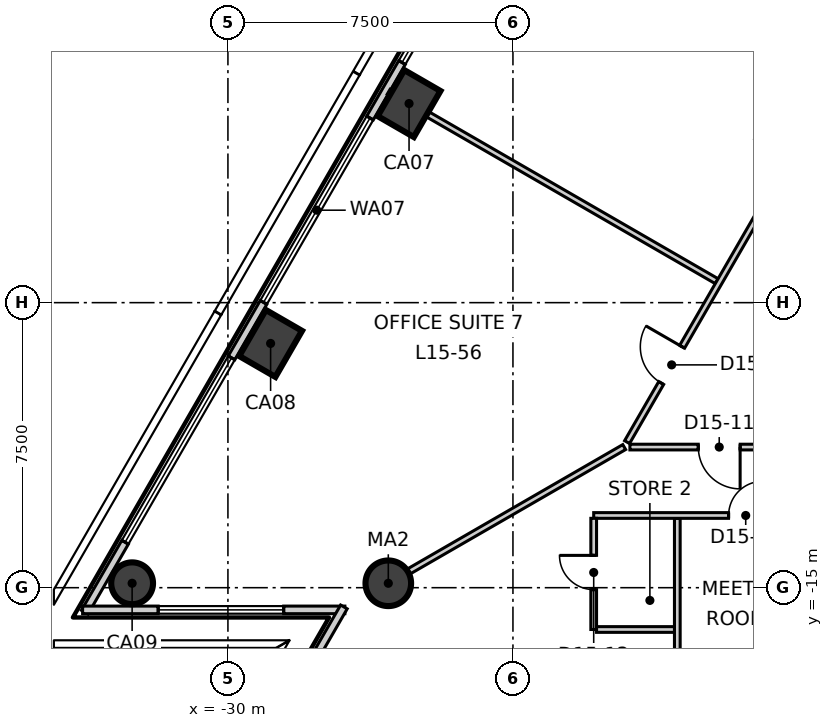
"""IFC4 building model, lengths in metres.
Left out: names, types, materials, properties, quantities, classifications, styles, units other than length and angle.
Written with IfcOpenShell. Run it as: python <this file> out.ifc"""

import sys

from ifc_helpers import new_model, si_unit, direction, frame, frame_2d, origin, origin_2d, place, context, subcontext, project, spatial, rectangle, circle, extrude, element, fill, save


model = new_model("IFC4")
c1 = context("Model", 3, precision=1e-05, world=origin(), true_north=direction((0.0, 1.0)))
c2 = subcontext(c1, "Body", "Model", "MODEL_VIEW")
j1 = project(units=[si_unit("LENGTHUNIT", "METRE"), si_unit("PLANEANGLEUNIT", "RADIAN")], contexts=[c1])
p1 = place(None, origin())
s1 = spatial("IfcSite", under=j1, at=p1, CompositionType="ELEMENT")
p2 = place(p1, origin())
s2 = spatial("IfcBuilding", under=s1, at=p2, CompositionType="ELEMENT")
p3 = place(p2, frame((0.0, 0.0, 71.3)))
s3 = spatial("IfcBuildingStorey", under=s2, at=p3, CompositionType="ELEMENT", Elevation=71.3)
for number, where, z_axis, x_axis in (
    (1, (-25.234, -2.261, -0.3), (0.0, 0.0, 1.0), (0.5, 0.866, 0.0)),
    (2, (-28.877, -8.573, -0.3), (0.0, 0.0, 1.0), (0.5, 0.866, 0.0)),
):
    element("IfcColumn", number, at=place(p3, frame(where, z_axis=z_axis, x_axis=x_axis)), inside=s3, PredefinedType="COLUMN", context=c2, shape_type="SweptSolid", body=[
        extrude(rectangle(XDim=1.4, YDim=1.1, at=origin_2d()), origin(), (0.0, 0.0, 1.0), 4.0),
    ])
p4 = place(p3, frame((-32.521, -14.884, -0.3), z_axis=(0.0, 0.0, 1.0), x_axis=(0.5, 0.866025403784, 0.0)))
e3 = element("IfcColumn", 3, at=p4, inside=s3, PredefinedType="COLUMN", context=c2, shape_type="SweptSolid", body=[
    extrude(circle(Radius=0.55, at=origin_2d()), origin(), (0.0, 0.0, 1.0), 4.0),
])
p5 = place(p3, frame((-25.78, -14.884, -0.3), z_axis=(0.0, 0.0, 1.0), x_axis=(1.0, 0.0, 0.0)))
e4 = element("IfcColumn", 4, at=p5, inside=s3, PredefinedType="COLUMN", context=c2, shape_type="SweptSolid", body=[
    extrude(circle(Radius=0.6, at=origin_2d()), origin(), (0.0, 0.0, 1.0), 4.0),
])
p6 = place(p3, frame((-3.326, 37.084, 0.0), z_axis=(0.0, 0.0, 1.0), x_axis=(-0.500000131003, -0.86602532815, 0.0)))
e5 = element("IfcWall", 5, at=p6, inside=s3, PredefinedType="ELEMENTEDWALL", context=c2, shape_type="SweptSolid", body=[
    extrude(rectangle(XDim=60.886, YDim=0.2, at=frame_2d((30.443, 0.0))), origin(), (0.0, 0.0, 1.0), 3.7),
])
p7 = place(p6, frame((2.146, 0.0, 0.9)))
e6 = element("IfcOpeningElement", 6, at=p7, cuts=e5, PredefinedType="OPENING", context=c2, shape_type="SweptSolid", body=[
    extrude(rectangle(XDim=5.6, YDim=2.5, at=frame_2d((2.8, 1.25))), frame((0.0, 0.11, 0.0), z_axis=(0.0, -1.0, 0.0), x_axis=(1.0, 0.0, 0.0)), (0.0, 0.0, 1.0), 0.22),
])
p8 = place(p6, frame((9.434, 0.0, 0.9)))
e7 = element("IfcOpeningElement", 7, at=p8, cuts=e5, PredefinedType="OPENING", context=c2, shape_type="SweptSolid", body=[
    extrude(rectangle(XDim=5.6, YDim=2.5, at=frame_2d((2.8, 1.25))), frame((0.0, 0.11, 0.0), z_axis=(0.0, -1.0, 0.0), x_axis=(1.0, 0.0, 0.0)), (0.0, 0.0, 1.0), 0.22),
])
p9 = place(p6, frame((16.721, 0.0, 0.9)))
e8 = element("IfcOpeningElement", 8, at=p9, cuts=e5, PredefinedType="OPENING", context=c2, shape_type="SweptSolid", body=[
    extrude(rectangle(XDim=5.6, YDim=2.5, at=frame_2d((2.8, 1.25))), frame((0.0, 0.11, 0.0), z_axis=(0.0, -1.0, 0.0), x_axis=(1.0, 0.0, 0.0)), (0.0, 0.0, 1.0), 0.22),
])
p10 = place(p6, frame((24.009, 0.0, 0.9)))
e9 = element("IfcOpeningElement", 9, at=p10, cuts=e5, PredefinedType="OPENING", context=c2, shape_type="SweptSolid", body=[
    extrude(rectangle(XDim=5.6, YDim=2.5, at=frame_2d((2.8, 1.25))), frame((0.0, 0.11, 0.0), z_axis=(0.0, -1.0, 0.0), x_axis=(1.0, 0.0, 0.0)), (0.0, 0.0, 1.0), 0.22),
])
p11 = place(p6, frame((31.297, 0.0, 0.9)))
e10 = element("IfcOpeningElement", 10, at=p11, cuts=e5, PredefinedType="OPENING", context=c2, shape_type="SweptSolid", body=[
    extrude(rectangle(XDim=5.6, YDim=2.5, at=frame_2d((2.8, 1.25))), frame((0.0, 0.11, 0.0), z_axis=(0.0, -1.0, 0.0), x_axis=(1.0, 0.0, 0.0)), (0.0, 0.0, 1.0), 0.22),
])
p12 = place(p6, frame((38.584, 0.0, 0.9)))
e11 = element("IfcOpeningElement", 11, at=p12, cuts=e5, PredefinedType="OPENING", context=c2, shape_type="SweptSolid", body=[
    extrude(rectangle(XDim=5.6, YDim=2.5, at=frame_2d((2.8, 1.25))), frame((0.0, 0.11, 0.0), z_axis=(0.0, -1.0, 0.0), x_axis=(1.0, 0.0, 0.0)), (0.0, 0.0, 1.0), 0.22),
])
p13 = place(p6, frame((45.872, 0.0, 0.9)))
e12 = element("IfcOpeningElement", 12, at=p13, cuts=e5, PredefinedType="OPENING", context=c2, shape_type="SweptSolid", body=[
    extrude(rectangle(XDim=5.6, YDim=2.5, at=frame_2d((2.8, 1.25))), frame((0.0, 0.11, 0.0), z_axis=(0.0, -1.0, 0.0), x_axis=(1.0, 0.0, 0.0)), (0.0, 0.0, 1.0), 0.22),
])
p14 = place(p6, frame((53.159, 0.0, 0.9)))
e13 = element("IfcOpeningElement", 13, at=p14, cuts=e5, PredefinedType="OPENING", context=c2, shape_type="SweptSolid", body=[
    extrude(rectangle(XDim=5.6, YDim=2.5, at=frame_2d((2.8, 1.25))), frame((0.0, 0.11, 0.0), z_axis=(0.0, -1.0, 0.0), x_axis=(1.0, 0.0, 0.0)), (0.0, 0.0, 1.0), 0.22),
])
p15 = place(p3, frame((-33.824, -15.584, 0.0), z_axis=(0.0, 0.0, 1.0), x_axis=(1.0, 0.0, 0.0)))
e14 = element("IfcWall", 14, at=p15, inside=s3, PredefinedType="ELEMENTEDWALL", context=c2, shape_type="SweptSolid", body=[
    extrude(rectangle(XDim=6.901, YDim=0.2, at=frame_2d((3.45, 0.0))), origin(), (0.0, 0.0, 1.0), 3.7),
])
p16 = place(p15, frame((1.99, 0.0, 0.9)))
e15 = element("IfcOpeningElement", 15, at=p16, cuts=e14, PredefinedType="OPENING", context=c2, shape_type="SweptSolid", body=[
    extrude(rectangle(XDim=3.3, YDim=2.5, at=frame_2d((1.65, 1.25))), frame((0.0, 0.11, 0.0), z_axis=(0.0, -1.0, 0.0), x_axis=(1.0, 0.0, 0.0)), (0.0, 0.0, 1.0), 0.22),
])
p17 = place(p3, frame((-26.948, -15.506, 0.0), z_axis=(0.0, 0.0, 1.0), x_axis=(-0.499917428568, -0.866073071175, 0.0)))
e16 = element("IfcWall", 16, at=p17, inside=s3, PredefinedType="ELEMENTEDWALL", context=c2, shape_type="SweptSolid", body=[
    extrude(rectangle(XDim=6.901, YDim=0.2, at=frame_2d((3.451, 0.0))), origin(), (0.0, 0.0, 1.0), 3.7),
])
p18 = place(p17, frame((1.39, 0.0, 0.9)))
e17 = element("IfcOpeningElement", 17, at=p18, cuts=e16, PredefinedType="OPENING", context=c2, shape_type="SweptSolid", body=[
    extrude(rectangle(XDim=3.3, YDim=2.5, at=frame_2d((1.65, 1.25))), frame((0.0, 0.11, 0.0), z_axis=(0.0, -1.0, 0.0), x_axis=(1.0, 0.0, 0.0)), (0.0, 0.0, 1.0), 0.22),
])
p19 = place(p3, frame((-26.317, -15.194, 0.0), z_axis=(0.0, 0.0, 1.0), x_axis=(0.866031591824, 0.499989281847, 0.0)))
e18 = element("IfcWall", 18, at=p19, inside=s3, PredefinedType="PARTITIONING", context=c2, shape_type="SweptSolid", body=[
    extrude(rectangle(XDim=7.788, YDim=0.15, at=frame_2d((3.894, 0.0))), origin(), (0.0, 0.0, 1.0), 3.1),
])
p20 = place(p3, frame((-25.771, -1.951, 0.0), z_axis=(0.0, 0.0, 1.0), x_axis=(0.866008152443, -0.500029879009, 0.0)))
e19 = element("IfcWall", 19, at=p20, inside=s3, PredefinedType="PARTITIONING", context=c2, shape_type="SweptSolid", body=[
    extrude(rectangle(XDim=9.968, YDim=0.15, at=frame_2d((4.984, 0.0))), origin(), (0.0, 0.0, 1.0), 3.7),
])
p21 = place(p3, frame((-19.497, -11.17, 0.0), z_axis=(0.0, 0.0, 1.0), x_axis=(0.499998854553, 0.866026065108, 0.0)))
e20 = element("IfcWall", 20, at=p21, inside=s3, PredefinedType="PARTITIONING", context=c2, shape_type="SweptSolid", body=[
    extrude(rectangle(XDim=38.994, YDim=0.15, at=frame_2d((19.497, 0.0))), origin(), (0.0, 0.0, 1.0), 3.7),
])
p22 = place(p21, frame((35.944, 0.0, 0.0)))
e21 = element("IfcOpeningElement", 21, at=p22, cuts=e20, PredefinedType="OPENING", context=c2, shape_type="SweptSolid", body=[
    extrude(rectangle(XDim=1.1, YDim=2.1, at=frame_2d((0.55, 1.05))), frame((0.0, 0.085, 0.0), z_axis=(0.0, -1.0, 0.0), x_axis=(1.0, 0.0, 0.0)), (0.0, 0.0, 1.0), 0.17),
])
p23 = place(p21, frame((26.148, 0.0, 0.0)))
e22 = element("IfcOpeningElement", 22, at=p23, cuts=e20, PredefinedType="OPENING", context=c2, shape_type="SweptSolid", body=[
    extrude(rectangle(XDim=1.1, YDim=2.1, at=frame_2d((0.55, 1.05))), frame((0.0, 0.085, 0.0), z_axis=(0.0, -1.0, 0.0), x_axis=(1.0, 0.0, 0.0)), (0.0, 0.0, 1.0), 0.17),
])
p24 = place(p21, frame((8.572, 0.0, 0.0)))
e23 = element("IfcOpeningElement", 23, at=p24, cuts=e20, PredefinedType="OPENING", context=c2, shape_type="SweptSolid", body=[
    extrude(rectangle(XDim=1.1, YDim=2.1, at=frame_2d((0.55, 1.05))), frame((0.0, 0.085, 0.0), z_axis=(0.0, -1.0, 0.0), x_axis=(1.0, 0.0, 0.0)), (0.0, 0.0, 1.0), 0.17),
])
p25 = place(p21, frame((17.172, 0.0, 0.0)))
e24 = element("IfcOpeningElement", 24, at=p25, cuts=e20, PredefinedType="OPENING", context=c2, shape_type="SweptSolid", body=[
    extrude(rectangle(XDim=0.9, YDim=2.1, at=frame_2d((0.45, 1.05))), frame((0.0, 0.085, 0.0), z_axis=(0.0, -1.0, 0.0), x_axis=(1.0, 0.0, 0.0)), (0.0, 0.0, 1.0), 0.17),
])
p26 = place(p21, frame((14.172, 0.0, 0.0)))
e25 = element("IfcOpeningElement", 25, at=p26, cuts=e20, PredefinedType="OPENING", context=c2, shape_type="SweptSolid", body=[
    extrude(rectangle(XDim=0.9, YDim=2.1, at=frame_2d((0.45, 1.05))), frame((0.0, 0.085, 0.0), z_axis=(0.0, -1.0, 0.0), x_axis=(1.0, 0.0, 0.0)), (0.0, 0.0, 1.0), 0.17),
])
p27 = place(p21, frame((1.797, 0.0, 0.0)))
e26 = element("IfcOpeningElement", 26, at=p27, cuts=e20, PredefinedType="OPENING", context=c2, shape_type="SweptSolid", body=[
    extrude(rectangle(XDim=1.1, YDim=2.1, at=frame_2d((0.55, 1.05))), frame((0.0, 0.085, 0.0), z_axis=(0.0, -1.0, 0.0), x_axis=(1.0, 0.0, 0.0)), (0.0, 0.0, 1.0), 0.17),
])
p28 = place(p3, frame((-19.422, -11.3, 0.0), z_axis=(0.0, 0.0, 1.0), x_axis=(1.0, 0.0, 0.0)))
e27 = element("IfcWall", 27, at=p28, inside=s3, PredefinedType="PARTITIONING", context=c2, shape_type="SweptSolid", body=[
    extrude(rectangle(XDim=38.994, YDim=0.15, at=frame_2d((19.497, 0.0))), origin(), (0.0, 0.0, 1.0), 3.7),
])
p29 = place(p28, frame((1.8, 0.0, 0.0)))
e28 = element("IfcOpeningElement", 28, at=p29, cuts=e27, PredefinedType="OPENING", context=c2, shape_type="SweptSolid", body=[
    extrude(rectangle(XDim=1.1, YDim=2.1, at=frame_2d((0.55, 1.05))), frame((0.0, 0.085, 0.0), z_axis=(0.0, -1.0, 0.0), x_axis=(1.0, 0.0, 0.0)), (0.0, 0.0, 1.0), 0.17),
])
p30 = place(p28, frame((9.197, 0.0, 0.0)))
e29 = element("IfcOpeningElement", 29, at=p30, cuts=e27, PredefinedType="OPENING", context=c2, shape_type="SweptSolid", body=[
    extrude(rectangle(XDim=1.0, YDim=2.1, at=frame_2d((0.5, 1.05))), frame((0.0, 0.085, 0.0), z_axis=(0.0, -1.0, 0.0), x_axis=(1.0, 0.0, 0.0)), (0.0, 0.0, 1.0), 0.17),
])
p31 = place(p28, frame((5.597, 0.0, 0.0)))
e30 = element("IfcOpeningElement", 30, at=p31, cuts=e27, PredefinedType="OPENING", context=c2, shape_type="SweptSolid", body=[
    extrude(rectangle(XDim=0.9, YDim=2.1, at=frame_2d((0.45, 1.05))), frame((0.0, 0.085, 0.0), z_axis=(0.0, -1.0, 0.0), x_axis=(1.0, 0.0, 0.0)), (0.0, 0.0, 1.0), 0.17),
])
p32 = place(p28, frame((23.284, 0.0, 0.0)))
e31 = element("IfcOpeningElement", 31, at=p32, cuts=e27, PredefinedType="OPENING", context=c2, shape_type="SweptSolid", body=[
    extrude(rectangle(XDim=1.1, YDim=2.1, at=frame_2d((0.55, 1.05))), frame((0.0, 0.085, 0.0), z_axis=(0.0, -1.0, 0.0), x_axis=(1.0, 0.0, 0.0)), (0.0, 0.0, 1.0), 0.17),
])
p33 = place(p28, frame((13.284, 0.0, 0.0)))
e32 = element("IfcOpeningElement", 32, at=p33, cuts=e27, PredefinedType="OPENING", context=c2, shape_type="SweptSolid", body=[
    extrude(rectangle(XDim=0.9, YDim=2.1, at=frame_2d((0.45, 1.05))), frame((0.0, 0.085, 0.0), z_axis=(0.0, -1.0, 0.0), x_axis=(1.0, 0.0, 0.0)), (0.0, 0.0, 1.0), 0.17),
])
p34 = place(p28, frame((16.484, 0.0, 0.0)))
e33 = element("IfcOpeningElement", 33, at=p34, cuts=e27, PredefinedType="OPENING", context=c2, shape_type="SweptSolid", body=[
    extrude(rectangle(XDim=0.9, YDim=2.1, at=frame_2d((0.45, 1.05))), frame((0.0, 0.085, 0.0), z_axis=(0.0, -1.0, 0.0), x_axis=(1.0, 0.0, 0.0)), (0.0, 0.0, 1.0), 0.17),
])
p35 = place(p28, frame((19.184, 0.0, 0.0)))
e34 = element("IfcOpeningElement", 34, at=p35, cuts=e27, PredefinedType="OPENING", context=c2, shape_type="SweptSolid", body=[
    extrude(rectangle(XDim=1.0, YDim=2.1, at=frame_2d((0.5, 1.05))), frame((0.0, 0.085, 0.0), z_axis=(0.0, -1.0, 0.0), x_axis=(1.0, 0.0, 0.0)), (0.0, 0.0, 1.0), 0.17),
])
p36 = place(p28, frame((29.86, 0.0, 0.0)))
e35 = element("IfcOpeningElement", 35, at=p36, cuts=e27, PredefinedType="OPENING", context=c2, shape_type="SweptSolid", body=[
    extrude(rectangle(XDim=1.0, YDim=2.1, at=frame_2d((0.5, 1.05))), frame((0.0, 0.085, 0.0), z_axis=(0.0, -1.0, 0.0), x_axis=(1.0, 0.0, 0.0)), (0.0, 0.0, 1.0), 0.17),
])
p37 = place(p28, frame((35.947, 0.0, 0.0)))
e36 = element("IfcOpeningElement", 36, at=p37, cuts=e27, PredefinedType="OPENING", context=c2, shape_type="SweptSolid", body=[
    extrude(rectangle(XDim=1.0, YDim=2.1, at=frame_2d((0.5, 1.05))), frame((0.0, 0.085, 0.0), z_axis=(0.0, -1.0, 0.0), x_axis=(1.0, 0.0, 0.0)), (0.0, 0.0, 1.0), 0.17),
])
p38 = place(p3, frame((-18.175, -16.9, 0.0), z_axis=(0.0, 0.0, 1.0), x_axis=(0.0, 1.0, 0.0)))
e37 = element("IfcWall", 37, at=p38, inside=s3, PredefinedType="PARTITIONING", context=c2, shape_type="SweptSolid", body=[
    extrude(rectangle(XDim=3.725, YDim=0.15, at=frame_2d((1.862, 0.0))), origin(), (0.0, 0.0, 1.0), 3.7),
])
p39 = place(p3, frame((-20.375, -13.1, 0.0), z_axis=(0.0, 0.0, 1.0), x_axis=(1.0, 0.0, 0.0)))
e38 = element("IfcWall", 38, at=p39, inside=s3, PredefinedType="PARTITIONING", context=c2, shape_type="SweptSolid", body=[
    extrude(rectangle(XDim=5.725, YDim=0.15, at=frame_2d((2.863, 0.0))), origin(), (0.0, 0.0, 1.0), 3.7),
])
p40 = place(p39, frame((3.55, 0.0, 0.0)))
e39 = element("IfcOpeningElement", 39, at=p40, cuts=e38, PredefinedType="OPENING", context=c2, shape_type="SweptSolid", body=[
    extrude(rectangle(XDim=0.9, YDim=2.1, at=frame_2d((0.45, 1.05))), frame((0.0, 0.085, 0.0), z_axis=(0.0, -1.0, 0.0), x_axis=(1.0, 0.0, 0.0)), (0.0, 0.0, 1.0), 0.17),
])
p41 = place(p3, frame((-20.375, -16.1, 0.0), z_axis=(0.0, 0.0, 1.0), x_axis=(0.0, 1.0, 0.0)))
e40 = element("IfcWall", 40, at=p41, inside=s3, PredefinedType="PARTITIONING", context=c2, shape_type="SweptSolid", body=[
    extrude(rectangle(XDim=2.925, YDim=0.15, at=frame_2d((1.462, 0.0))), origin(), (0.0, 0.0, 1.0), 3.7),
])
p42 = place(p41, frame((1.05, 0.0, 0.0)))
e41 = element("IfcOpeningElement", 41, at=p42, cuts=e40, PredefinedType="OPENING", context=c2, shape_type="SweptSolid", body=[
    extrude(rectangle(XDim=0.9, YDim=2.1, at=frame_2d((0.45, 1.05))), frame((0.0, 0.085, 0.0), z_axis=(0.0, -1.0, 0.0), x_axis=(1.0, 0.0, 0.0)), (0.0, 0.0, 1.0), 0.17),
])
p43 = place(p3, frame((-20.3, -16.1, 0.0), z_axis=(0.0, 0.0, 1.0), x_axis=(1.0, 0.0, 0.0)))
e42 = element("IfcWall", 42, at=p43, inside=s3, PredefinedType="PARTITIONING", context=c2, shape_type="SweptSolid", body=[
    extrude(rectangle(XDim=2.05, YDim=0.15, at=frame_2d((1.025, 0.0))), origin(), (0.0, 0.0, 1.0), 3.7),
])
p44 = place(p12, origin())
e43 = element("IfcWindow", 43, at=p44, inside=s3, PartitioningType="SINGLE_PANEL", PredefinedType="WINDOW", context=c2, shape_type="SweptSolid", body=[
    extrude(rectangle(XDim=5.6, YDim=2.5, at=frame_2d((2.8, 1.25))), frame((0.0, 0.03, 0.0), z_axis=(0.0, -1.0, 0.0), x_axis=(1.0, 0.0, 0.0)), (0.0, 0.0, 1.0), 0.06),
])
fill(e11, e43)
p45 = place(p13, origin())
e44 = element("IfcWindow", 44, at=p45, inside=s3, PartitioningType="SINGLE_PANEL", PredefinedType="WINDOW", context=c2, shape_type="SweptSolid", body=[
    extrude(rectangle(XDim=5.6, YDim=2.5, at=frame_2d((2.8, 1.25))), frame((0.0, 0.03, 0.0), z_axis=(0.0, -1.0, 0.0), x_axis=(1.0, 0.0, 0.0)), (0.0, 0.0, 1.0), 0.06),
])
fill(e12, e44)
p46 = place(p14, origin())
e45 = element("IfcWindow", 45, at=p46, inside=s3, PartitioningType="SINGLE_PANEL", PredefinedType="WINDOW", context=c2, shape_type="SweptSolid", body=[
    extrude(rectangle(XDim=5.6, YDim=2.5, at=frame_2d((2.8, 1.25))), frame((0.0, 0.03, 0.0), z_axis=(0.0, -1.0, 0.0), x_axis=(1.0, 0.0, 0.0)), (0.0, 0.0, 1.0), 0.06),
])
fill(e13, e45)
p47 = place(p16, origin())
e46 = element("IfcWindow", 46, at=p47, inside=s3, PartitioningType="SINGLE_PANEL", PredefinedType="WINDOW", context=c2, shape_type="SweptSolid", body=[
    extrude(rectangle(XDim=3.3, YDim=2.5, at=frame_2d((1.65, 1.25))), frame((0.0, 0.03, 0.0), z_axis=(0.0, -1.0, 0.0), x_axis=(1.0, 0.0, 0.0)), (0.0, 0.0, 1.0), 0.06),
])
fill(e15, e46)
p48 = place(p29, origin())
e47 = element("IfcDoor", 47, at=p48, inside=s3, OperationType="SINGLE_SWING_RIGHT", PredefinedType="DOOR", context=c2, shape_type="SweptSolid", body=[
    extrude(rectangle(XDim=1.1, YDim=2.1, at=frame_2d((0.55, 1.05))), frame((0.0, 0.025, 0.0), z_axis=(0.0, -1.0, 0.0), x_axis=(1.0, 0.0, 0.0)), (0.0, 0.0, 1.0), 0.05),
])
fill(e28, e47)
p49 = place(p40, origin())
e48 = element("IfcDoor", 48, at=p49, inside=s3, OperationType="SINGLE_SWING_LEFT", PredefinedType="DOOR", context=c2, shape_type="SweptSolid", body=[
    extrude(rectangle(XDim=0.9, YDim=2.1, at=frame_2d((0.45, 1.05))), frame((0.0, 0.025, 0.0), z_axis=(0.0, -1.0, 0.0), x_axis=(1.0, 0.0, 0.0)), (0.0, 0.0, 1.0), 0.05),
])
fill(e39, e48)
p50 = place(p42, origin())
e49 = element("IfcDoor", 49, at=p50, inside=s3, OperationType="SINGLE_SWING_LEFT", PredefinedType="DOOR", context=c2, shape_type="SweptSolid", body=[
    extrude(rectangle(XDim=0.9, YDim=2.1, at=frame_2d((0.45, 1.05))), frame((0.0, 0.025, 0.0), z_axis=(0.0, -1.0, 0.0), x_axis=(1.0, 0.0, 0.0)), (0.0, 0.0, 1.0), 0.05),
])
fill(e41, e49)
p51 = place(p27, origin())
e50 = element("IfcDoor", 50, at=p51, inside=s3, OperationType="SINGLE_SWING_LEFT", PredefinedType="DOOR", context=c2, shape_type="SweptSolid", body=[
    extrude(rectangle(XDim=1.1, YDim=2.1, at=frame_2d((0.55, 1.05))), frame((0.0, 0.025, 0.0), z_axis=(0.0, -1.0, 0.0), x_axis=(1.0, 0.0, 0.0)), (0.0, 0.0, 1.0), 0.05),
])
fill(e26, e50)
save(model, sys.argv[1])
